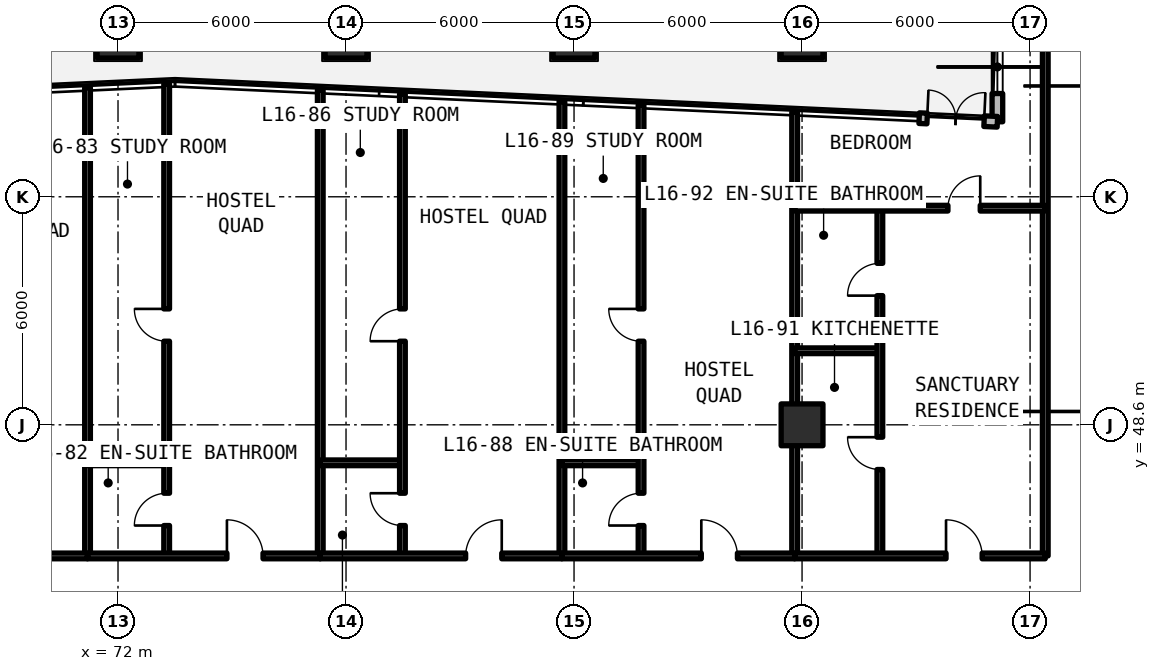
"""IFC4 building model, lengths in metres.
Left out: names, types, materials, properties, quantities, classifications, styles, units other than length and angle.
Written with IfcOpenShell. Run it as: python <this file> out.ifc"""

import sys

from ifc_helpers import new_model, si_unit, direction, frame, frame_2d, origin, origin_2d, place, context, subcontext, project, spatial, rectangle, extrude, element, fill, save


model = new_model("IFC4")
c1 = context("Model", 3, precision=1e-05, world=origin(), true_north=direction((0.0, 1.0)))
c2 = subcontext(c1, "Body", "Model", "MODEL_VIEW")
j1 = project(units=[si_unit("LENGTHUNIT", "METRE"), si_unit("PLANEANGLEUNIT", "RADIAN")], contexts=[c1])
p1 = place(None, origin())
s1 = spatial("IfcSite", under=j1, at=p1, CompositionType="ELEMENT")
p2 = place(p1, origin())
s2 = spatial("IfcBuilding", under=s1, at=p2, CompositionType="ELEMENT")
p3 = place(p2, frame((0.0, 0.0, 58.74)))
s3 = spatial("IfcBuildingStorey", under=s2, at=p3, CompositionType="ELEMENT", Elevation=58.74)
for number, where, z_axis, x_axis in (
    (1, (90.0, 48.6, 0.0), (0.0, 0.0, 1.0), (1.0, 0.0, 0.0)),
    (2, (72.0, 58.8, 0.0), (0.0, 0.0, 1.0), (1.0, 0.0, 0.0)),
    (3, (78.0, 58.8, 0.0), (0.0, 0.0, 1.0), (1.0, 0.0, 0.0)),
    (4, (84.0, 58.8, 0.0), (0.0, 0.0, 1.0), (1.0, 0.0, 0.0)),
    (5, (90.0, 58.8, 0.0), (0.0, 0.0, 1.0), (1.0, 0.0, 0.0)),
):
    element("IfcColumn", number, at=place(p3, frame(where, z_axis=z_axis, x_axis=x_axis)), inside=s3, PredefinedType="COLUMN", context=c2, shape_type="SweptSolid", body=[
        extrude(rectangle(XDim=1.1, YDim=1.1, at=origin_2d()), origin(), (0.0, 0.0, 1.0), 3.63),
    ])
p4 = place(p3, frame((100.66, 55.342, 0.0), z_axis=(0.0, 0.0, 1.0), x_axis=(-0.707106781187, 0.707106781187, 0.0)))
e6 = element("IfcWall", 6, at=p4, inside=s3, PredefinedType="SOLIDWALL", context=c2, shape_type="SweptSolid", body=[
    extrude(rectangle(XDim=5.824, YDim=0.28, at=frame_2d((2.912, 0.0))), origin(), (0.0, 0.0, 1.0), 3.41),
])
p5 = place(p4, frame((1.212, 0.0, 0.78)))
e7 = element("IfcOpeningElement", 7, at=p5, cuts=e6, PredefinedType="OPENING", context=c2, shape_type="SweptSolid", body=[
    extrude(rectangle(XDim=3.4, YDim=1.66, at=frame_2d((1.7, 0.83))), frame((0.0, 0.15, 0.0), z_axis=(0.0, -1.0, 0.0), x_axis=(1.0, 0.0, 0.0)), (0.0, 0.0, 1.0), 0.3),
])
p6 = place(p3, frame((95.14, 59.46, 0.0), z_axis=(0.0, 0.0, 1.0), x_axis=(0.0, -1.0, 0.0)))
e8 = element("IfcWall", 8, at=p6, inside=s3, PredefinedType="SOLIDWALL", context=c2, shape_type="SweptSolid", body=[
    extrude(rectangle(XDim=2.887, YDim=0.28, at=frame_2d((1.443, 0.0))), origin(), (0.0, 0.0, 1.0), 3.41),
])
p7 = place(p6, frame((0.743, 0.0, 0.78)))
e9 = element("IfcOpeningElement", 9, at=p7, cuts=e8, PredefinedType="OPENING", context=c2, shape_type="SweptSolid", body=[
    extrude(rectangle(XDim=1.4, YDim=1.65, at=frame_2d((0.7, 0.825))), frame((0.0, 0.15, 0.0), z_axis=(0.0, -1.0, 0.0), x_axis=(1.0, 0.0, 0.0)), (0.0, 0.0, 1.0), 0.3),
])
p8 = place(p3, frame((95.14, 56.573, 0.0), z_axis=(0.0, 0.0, 1.0), x_axis=(-0.998920086078, 0.046461399352, 0.0)))
e10 = element("IfcWall", 10, at=p8, inside=s3, PredefinedType="SOLIDWALL", context=c2, shape_type="SweptSolid", body=[
    extrude(rectangle(XDim=2.06, YDim=0.28, at=frame_2d((1.03, 0.0))), origin(), (0.0, 0.0, 1.0), 3.41),
])
p9 = place(p8, frame((0.35, 0.0, 0.0)))
e11 = element("IfcOpeningElement", 11, at=p9, cuts=e10, PredefinedType="OPENING", context=c2, shape_type="SweptSolid", body=[
    extrude(rectangle(XDim=1.5, YDim=2.2, at=frame_2d((0.75, 1.1))), frame((0.0, 0.15, 0.0), z_axis=(0.0, -1.0, 0.0), x_axis=(1.0, 0.0, 0.0)), (0.0, 0.0, 1.0), 0.3),
])
p10 = place(p3, frame((96.4, 45.15, 0.0), z_axis=(0.0, 0.0, 1.0), x_axis=(0.0, 1.0, 0.0)))
e12 = element("IfcWall", 12, at=p10, inside=s3, PredefinedType="SOLIDWALL", context=c2, shape_type="SweptSolid", body=[
    extrude(rectangle(XDim=14.31, YDim=0.15, at=frame_2d((7.155, 0.0))), origin(), (0.0, 0.0, 1.0), 2.63),
])
p11 = place(p3, frame((71.198, 45.15, 0.0), z_axis=(0.0, 0.0, 1.0), x_axis=(0.0, 1.0, 0.0)))
e13 = element("IfcWall", 13, at=p11, inside=s3, PredefinedType="SOLIDWALL", context=c2, shape_type="SweptSolid", body=[
    extrude(rectangle(XDim=12.323, YDim=0.15, at=frame_2d((6.162, 0.0))), origin(), (0.0, 0.0, 1.0), 2.63),
])
p12 = place(p3, frame((64.603, 45.15, 0.0), z_axis=(0.0, 0.0, 1.0), x_axis=(1.0, 0.0, 0.0)))
e14 = element("IfcWall", 14, at=p12, inside=s3, PredefinedType="SOLIDWALL", context=c2, shape_type="SweptSolid", body=[
    extrude(rectangle(XDim=6.595, YDim=0.15, at=frame_2d((3.297, 0.0))), origin(), (0.0, 0.0, 1.0), 2.63),
])
p13 = place(p12, frame((3.984, 0.0, 0.0)))
e15 = element("IfcOpeningElement", 15, at=p13, cuts=e14, PredefinedType="OPENING", context=c2, shape_type="SweptSolid", body=[
    extrude(rectangle(XDim=0.95, YDim=2.15, at=frame_2d((0.475, 1.075))), frame((0.0, 0.085, 0.0), z_axis=(0.0, -1.0, 0.0), x_axis=(1.0, 0.0, 0.0)), (0.0, 0.0, 1.0), 0.17),
])
p14 = place(p3, frame((77.322, 45.15, 0.0), z_axis=(0.0, 0.0, 1.0), x_axis=(0.0, 1.0, 0.0)))
e16 = element("IfcWall", 16, at=p14, inside=s3, PredefinedType="SOLIDWALL", context=c2, shape_type="SweptSolid", body=[
    extrude(rectangle(XDim=12.252, YDim=0.15, at=frame_2d((6.126, 0.0))), origin(), (0.0, 0.0, 1.0), 2.63),
])
p15 = place(p3, frame((71.198, 47.6, 0.0), z_axis=(0.0, 0.0, 1.0), x_axis=(1.0, 0.0, 0.0)))
e17 = element("IfcWall", 17, at=p15, inside=s3, PredefinedType="PARTITIONING", context=c2, shape_type="SweptSolid", body=[
    extrude(rectangle(XDim=2.082, YDim=0.15, at=frame_2d((1.041, 0.0))), origin(), (0.0, 0.0, 1.0), 2.63),
])
p16 = place(p3, frame((73.28, 45.15, 0.0), z_axis=(0.0, 0.0, 1.0), x_axis=(0.0, 1.0, 0.0)))
e18 = element("IfcWall", 18, at=p16, inside=s3, PredefinedType="PARTITIONING", context=c2, shape_type="SweptSolid", body=[
    extrude(rectangle(XDim=12.42, YDim=0.15, at=frame_2d((6.21, 0.0))), origin(), (0.0, 0.0, 1.0), 2.63),
])
p17 = place(p16, frame((0.8, 0.0, 0.0)))
e19 = element("IfcOpeningElement", 19, at=p17, cuts=e18, PredefinedType="OPENING", context=c2, shape_type="SweptSolid", body=[
    extrude(rectangle(XDim=0.85, YDim=2.1, at=frame_2d((0.425, 1.05))), frame((0.0, 0.085, 0.0), z_axis=(0.0, -1.0, 0.0), x_axis=(1.0, 0.0, 0.0)), (0.0, 0.0, 1.0), 0.17),
])
p18 = place(p16, frame((5.65, 0.0, 0.0)))
e20 = element("IfcOpeningElement", 20, at=p18, cuts=e18, PredefinedType="OPENING", context=c2, shape_type="SweptSolid", body=[
    extrude(rectangle(XDim=0.85, YDim=2.1, at=frame_2d((0.425, 1.05))), frame((0.0, 0.085, 0.0), z_axis=(0.0, -1.0, 0.0), x_axis=(1.0, 0.0, 0.0)), (0.0, 0.0, 1.0), 0.17),
])
p19 = place(p3, frame((71.198, 45.15, 0.0), z_axis=(0.0, 0.0, 1.0), x_axis=(1.0, 0.0, 0.0)))
e21 = element("IfcWall", 21, at=p19, inside=s3, PredefinedType="SOLIDWALL", context=c2, shape_type="SweptSolid", body=[
    extrude(rectangle(XDim=6.124, YDim=0.15, at=frame_2d((3.062, 0.0))), origin(), (0.0, 0.0, 1.0), 2.63),
])
p20 = place(p19, frame((3.668, 0.0, 0.0)))
e22 = element("IfcOpeningElement", 22, at=p20, cuts=e21, PredefinedType="OPENING", context=c2, shape_type="SweptSolid", body=[
    extrude(rectangle(XDim=0.95, YDim=2.15, at=frame_2d((0.475, 1.075))), frame((0.0, 0.085, 0.0), z_axis=(0.0, -1.0, 0.0), x_axis=(1.0, 0.0, 0.0)), (0.0, 0.0, 1.0), 0.17),
])
p21 = place(p3, frame((83.681, 45.15, 0.0), z_axis=(0.0, 0.0, 1.0), x_axis=(0.0, 1.0, 0.0)))
e23 = element("IfcWall", 23, at=p21, inside=s3, PredefinedType="SOLIDWALL", context=c2, shape_type="SweptSolid", body=[
    extrude(rectangle(XDim=11.956, YDim=0.15, at=frame_2d((5.978, 0.0))), origin(), (0.0, 0.0, 1.0), 2.63),
])
p22 = place(p3, frame((77.322, 47.6, 0.0), z_axis=(0.0, 0.0, 1.0), x_axis=(1.0, 0.0, 0.0)))
e24 = element("IfcWall", 24, at=p22, inside=s3, PredefinedType="PARTITIONING", context=c2, shape_type="SweptSolid", body=[
    extrude(rectangle(XDim=2.162, YDim=0.15, at=frame_2d((1.081, 0.0))), origin(), (0.0, 0.0, 1.0), 2.63),
])
p23 = place(p3, frame((79.484, 45.15, 0.0), z_axis=(0.0, 0.0, 1.0), x_axis=(0.0, 1.0, 0.0)))
e25 = element("IfcWall", 25, at=p23, inside=s3, PredefinedType="PARTITIONING", context=c2, shape_type="SweptSolid", body=[
    extrude(rectangle(XDim=12.152, YDim=0.15, at=frame_2d((6.076, 0.0))), origin(), (0.0, 0.0, 1.0), 2.63),
])
p24 = place(p23, frame((0.8, 0.0, 0.0)))
e26 = element("IfcOpeningElement", 26, at=p24, cuts=e25, PredefinedType="OPENING", context=c2, shape_type="SweptSolid", body=[
    extrude(rectangle(XDim=0.85, YDim=2.1, at=frame_2d((0.425, 1.05))), frame((0.0, 0.085, 0.0), z_axis=(0.0, -1.0, 0.0), x_axis=(1.0, 0.0, 0.0)), (0.0, 0.0, 1.0), 0.17),
])
p25 = place(p23, frame((5.65, 0.0, 0.0)))
e27 = element("IfcOpeningElement", 27, at=p25, cuts=e25, PredefinedType="OPENING", context=c2, shape_type="SweptSolid", body=[
    extrude(rectangle(XDim=0.85, YDim=2.1, at=frame_2d((0.425, 1.05))), frame((0.0, 0.085, 0.0), z_axis=(0.0, -1.0, 0.0), x_axis=(1.0, 0.0, 0.0)), (0.0, 0.0, 1.0), 0.17),
])
p26 = place(p3, frame((77.322, 45.15, 0.0), z_axis=(0.0, 0.0, 1.0), x_axis=(1.0, 0.0, 0.0)))
e28 = element("IfcWall", 28, at=p26, inside=s3, PredefinedType="SOLIDWALL", context=c2, shape_type="SweptSolid", body=[
    extrude(rectangle(XDim=6.359, YDim=0.15, at=frame_2d((3.18, 0.0))), origin(), (0.0, 0.0, 1.0), 2.63),
])
p27 = place(p26, frame((3.826, 0.0, 0.0)))
e29 = element("IfcOpeningElement", 29, at=p27, cuts=e28, PredefinedType="OPENING", context=c2, shape_type="SweptSolid", body=[
    extrude(rectangle(XDim=0.95, YDim=2.15, at=frame_2d((0.475, 1.075))), frame((0.0, 0.085, 0.0), z_axis=(0.0, -1.0, 0.0), x_axis=(1.0, 0.0, 0.0)), (0.0, 0.0, 1.0), 0.17),
])
p28 = place(p3, frame((89.805, 45.15, 0.0), z_axis=(0.0, 0.0, 1.0), x_axis=(0.0, 1.0, 0.0)))
e30 = element("IfcWall", 30, at=p28, inside=s3, PredefinedType="SOLIDWALL", context=c2, shape_type="SweptSolid", body=[
    extrude(rectangle(XDim=11.672, YDim=0.15, at=frame_2d((5.836, 0.0))), origin(), (0.0, 0.0, 1.0), 2.63),
])
p29 = place(p3, frame((83.681, 47.6, 0.0), z_axis=(0.0, 0.0, 1.0), x_axis=(1.0, 0.0, 0.0)))
e31 = element("IfcWall", 31, at=p29, inside=s3, PredefinedType="PARTITIONING", context=c2, shape_type="SweptSolid", body=[
    extrude(rectangle(XDim=2.082, YDim=0.15, at=frame_2d((1.041, 0.0))), origin(), (0.0, 0.0, 1.0), 2.63),
])
p30 = place(p3, frame((85.763, 45.15, 0.0), z_axis=(0.0, 0.0, 1.0), x_axis=(0.0, 1.0, 0.0)))
e32 = element("IfcWall", 32, at=p30, inside=s3, PredefinedType="PARTITIONING", context=c2, shape_type="SweptSolid", body=[
    extrude(rectangle(XDim=11.86, YDim=0.15, at=frame_2d((5.93, 0.0))), origin(), (0.0, 0.0, 1.0), 2.63),
])
p31 = place(p30, frame((0.8, 0.0, 0.0)))
e33 = element("IfcOpeningElement", 33, at=p31, cuts=e32, PredefinedType="OPENING", context=c2, shape_type="SweptSolid", body=[
    extrude(rectangle(XDim=0.85, YDim=2.1, at=frame_2d((0.425, 1.05))), frame((0.0, 0.085, 0.0), z_axis=(0.0, -1.0, 0.0), x_axis=(1.0, 0.0, 0.0)), (0.0, 0.0, 1.0), 0.17),
])
p32 = place(p30, frame((5.65, 0.0, 0.0)))
e34 = element("IfcOpeningElement", 34, at=p32, cuts=e32, PredefinedType="OPENING", context=c2, shape_type="SweptSolid", body=[
    extrude(rectangle(XDim=0.85, YDim=2.1, at=frame_2d((0.425, 1.05))), frame((0.0, 0.085, 0.0), z_axis=(0.0, -1.0, 0.0), x_axis=(1.0, 0.0, 0.0)), (0.0, 0.0, 1.0), 0.17),
])
p33 = place(p3, frame((83.681, 45.15, 0.0), z_axis=(0.0, 0.0, 1.0), x_axis=(1.0, 0.0, 0.0)))
e35 = element("IfcWall", 35, at=p33, inside=s3, PredefinedType="SOLIDWALL", context=c2, shape_type="SweptSolid", body=[
    extrude(rectangle(XDim=6.124, YDim=0.15, at=frame_2d((3.062, 0.0))), origin(), (0.0, 0.0, 1.0), 2.63),
])
p34 = place(p33, frame((3.668, 0.0, 0.0)))
e36 = element("IfcOpeningElement", 36, at=p34, cuts=e35, PredefinedType="OPENING", context=c2, shape_type="SweptSolid", body=[
    extrude(rectangle(XDim=0.95, YDim=2.15, at=frame_2d((0.475, 1.075))), frame((0.0, 0.085, 0.0), z_axis=(0.0, -1.0, 0.0), x_axis=(1.0, 0.0, 0.0)), (0.0, 0.0, 1.0), 0.17),
])
p35 = place(p3, frame((89.805, 50.549, 0.0), z_axis=(0.0, 0.0, 1.0), x_axis=(1.0, 0.0, 0.0)))
e37 = element("IfcWall", 37, at=p35, inside=s3, PredefinedType="PARTITIONING", context=c2, shape_type="SweptSolid", body=[
    extrude(rectangle(XDim=2.242, YDim=0.15, at=frame_2d((1.121, 0.0))), origin(), (0.0, 0.0, 1.0), 2.63),
])
p36 = place(p3, frame((92.047, 45.15, 0.0), z_axis=(0.0, 0.0, 1.0), x_axis=(0.0, 1.0, 0.0)))
e38 = element("IfcWall", 38, at=p36, inside=s3, PredefinedType="PARTITIONING", context=c2, shape_type="SweptSolid", body=[
    extrude(rectangle(XDim=9.15, YDim=0.15, at=frame_2d((4.575, 0.0))), origin(), (0.0, 0.0, 1.0), 2.63),
])
p37 = place(p36, frame((2.274, 0.0, 0.0)))
e39 = element("IfcOpeningElement", 39, at=p37, cuts=e38, PredefinedType="OPENING", context=c2, shape_type="SweptSolid", body=[
    extrude(rectangle(XDim=0.85, YDim=2.1, at=frame_2d((0.425, 1.05))), frame((0.0, 0.085, 0.0), z_axis=(0.0, -1.0, 0.0), x_axis=(1.0, 0.0, 0.0)), (0.0, 0.0, 1.0), 0.17),
])
p38 = place(p36, frame((6.849, 0.0, 0.0)))
e40 = element("IfcOpeningElement", 40, at=p38, cuts=e38, PredefinedType="OPENING", context=c2, shape_type="SweptSolid", body=[
    extrude(rectangle(XDim=0.85, YDim=2.1, at=frame_2d((0.425, 1.05))), frame((0.0, 0.085, 0.0), z_axis=(0.0, -1.0, 0.0), x_axis=(1.0, 0.0, 0.0)), (0.0, 0.0, 1.0), 0.17),
])
p39 = place(p3, frame((89.805, 54.3, 0.0), z_axis=(0.0, 0.0, 1.0), x_axis=(1.0, 0.0, 0.0)))
e41 = element("IfcWall", 41, at=p39, inside=s3, PredefinedType="PARTITIONING", context=c2, shape_type="SweptSolid", body=[
    extrude(rectangle(XDim=6.595, YDim=0.15, at=frame_2d((3.297, 0.0))), origin(), (0.0, 0.0, 1.0), 2.63),
])
p40 = place(p39, frame((4.034, 0.0, 0.0)))
e42 = element("IfcOpeningElement", 42, at=p40, cuts=e41, PredefinedType="OPENING", context=c2, shape_type="SweptSolid", body=[
    extrude(rectangle(XDim=0.85, YDim=2.1, at=frame_2d((0.425, 1.05))), frame((0.0, 0.085, 0.0), z_axis=(0.0, -1.0, 0.0), x_axis=(1.0, 0.0, 0.0)), (0.0, 0.0, 1.0), 0.17),
])
p41 = place(p3, frame((89.805, 45.15, 0.0), z_axis=(0.0, 0.0, 1.0), x_axis=(1.0, 0.0, 0.0)))
e43 = element("IfcWall", 43, at=p41, inside=s3, PredefinedType="SOLIDWALL", context=c2, shape_type="SweptSolid", body=[
    extrude(rectangle(XDim=6.595, YDim=0.15, at=frame_2d((3.297, 0.0))), origin(), (0.0, 0.0, 1.0), 2.63),
])
p42 = place(p41, frame((3.984, 0.0, 0.0)))
e44 = element("IfcOpeningElement", 44, at=p42, cuts=e43, PredefinedType="OPENING", context=c2, shape_type="SweptSolid", body=[
    extrude(rectangle(XDim=0.95, YDim=2.15, at=frame_2d((0.475, 1.075))), frame((0.0, 0.085, 0.0), z_axis=(0.0, -1.0, 0.0), x_axis=(1.0, 0.0, 0.0)), (0.0, 0.0, 1.0), 0.17),
])
p43 = place(p7, origin())
e45 = element("IfcWindow", 45, at=p43, inside=s3, PartitioningType="SINGLE_PANEL", PredefinedType="WINDOW", context=c2, shape_type="SweptSolid", body=[
    extrude(rectangle(XDim=1.4, YDim=1.65, at=frame_2d((0.7, 0.825))), frame((0.0, 0.03, 0.0), z_axis=(0.0, -1.0, 0.0), x_axis=(1.0, 0.0, 0.0)), (0.0, 0.0, 1.0), 0.06),
])
fill(e9, e45)
p44 = place(p9, frame((1.5, 0.0, 0.0), z_axis=(0.0, 0.0, 1.0), x_axis=(-1.0, 0.0, 0.0)))
e46 = element("IfcDoor", 46, at=p44, inside=s3, OperationType="SINGLE_SWING_RIGHT", PredefinedType="DOOR", context=c2, shape_type="SweptSolid", body=[
    extrude(rectangle(XDim=1.5, YDim=2.2, at=frame_2d((0.75, 1.1))), frame((0.0, 0.025, 0.0), z_axis=(0.0, -1.0, 0.0), x_axis=(1.0, 0.0, 0.0)), (0.0, 0.0, 1.0), 0.05),
])
fill(e11, e46)
p45 = place(p17, origin())
e47 = element("IfcDoor", 47, at=p45, inside=s3, OperationType="SINGLE_SWING_LEFT", PredefinedType="DOOR", context=c2, shape_type="SweptSolid", body=[
    extrude(rectangle(XDim=0.85, YDim=2.1, at=frame_2d((0.425, 1.05))), frame((0.0, 0.025, 0.0), z_axis=(0.0, -1.0, 0.0), x_axis=(1.0, 0.0, 0.0)), (0.0, 0.0, 1.0), 0.05),
])
fill(e19, e47)
p46 = place(p18, origin())
e48 = element("IfcDoor", 48, at=p46, inside=s3, OperationType="SINGLE_SWING_RIGHT", PredefinedType="DOOR", context=c2, shape_type="SweptSolid", body=[
    extrude(rectangle(XDim=0.85, YDim=2.1, at=frame_2d((0.425, 1.05))), frame((0.0, 0.025, 0.0), z_axis=(0.0, -1.0, 0.0), x_axis=(1.0, 0.0, 0.0)), (0.0, 0.0, 1.0), 0.05),
])
fill(e20, e48)
p47 = place(p20, origin())
e49 = element("IfcDoor", 49, at=p47, inside=s3, OperationType="SINGLE_SWING_LEFT", PredefinedType="DOOR", context=c2, shape_type="SweptSolid", body=[
    extrude(rectangle(XDim=0.95, YDim=2.15, at=frame_2d((0.475, 1.075))), frame((0.0, 0.025, 0.0), z_axis=(0.0, -1.0, 0.0), x_axis=(1.0, 0.0, 0.0)), (0.0, 0.0, 1.0), 0.05),
])
fill(e22, e49)
p48 = place(p24, origin())
e50 = element("IfcDoor", 50, at=p48, inside=s3, OperationType="SINGLE_SWING_RIGHT", PredefinedType="DOOR", context=c2, shape_type="SweptSolid", body=[
    extrude(rectangle(XDim=0.85, YDim=2.1, at=frame_2d((0.425, 1.05))), frame((0.0, 0.025, 0.0), z_axis=(0.0, -1.0, 0.0), x_axis=(1.0, 0.0, 0.0)), (0.0, 0.0, 1.0), 0.05),
])
fill(e26, e50)
p49 = place(p25, origin())
e51 = element("IfcDoor", 51, at=p49, inside=s3, OperationType="SINGLE_SWING_LEFT", PredefinedType="DOOR", context=c2, shape_type="SweptSolid", body=[
    extrude(rectangle(XDim=0.85, YDim=2.1, at=frame_2d((0.425, 1.05))), frame((0.0, 0.025, 0.0), z_axis=(0.0, -1.0, 0.0), x_axis=(1.0, 0.0, 0.0)), (0.0, 0.0, 1.0), 0.05),
])
fill(e27, e51)
p50 = place(p27, origin())
e52 = element("IfcDoor", 52, at=p50, inside=s3, OperationType="SINGLE_SWING_RIGHT", PredefinedType="DOOR", context=c2, shape_type="SweptSolid", body=[
    extrude(rectangle(XDim=0.95, YDim=2.15, at=frame_2d((0.475, 1.075))), frame((0.0, 0.025, 0.0), z_axis=(0.0, -1.0, 0.0), x_axis=(1.0, 0.0, 0.0)), (0.0, 0.0, 1.0), 0.05),
])
fill(e29, e52)
p51 = place(p31, origin())
e53 = element("IfcDoor", 53, at=p51, inside=s3, OperationType="SINGLE_SWING_LEFT", PredefinedType="DOOR", context=c2, shape_type="SweptSolid", body=[
    extrude(rectangle(XDim=0.85, YDim=2.1, at=frame_2d((0.425, 1.05))), frame((0.0, 0.025, 0.0), z_axis=(0.0, -1.0, 0.0), x_axis=(1.0, 0.0, 0.0)), (0.0, 0.0, 1.0), 0.05),
])
fill(e33, e53)
p52 = place(p32, origin())
e54 = element("IfcDoor", 54, at=p52, inside=s3, OperationType="SINGLE_SWING_RIGHT", PredefinedType="DOOR", context=c2, shape_type="SweptSolid", body=[
    extrude(rectangle(XDim=0.85, YDim=2.1, at=frame_2d((0.425, 1.05))), frame((0.0, 0.025, 0.0), z_axis=(0.0, -1.0, 0.0), x_axis=(1.0, 0.0, 0.0)), (0.0, 0.0, 1.0), 0.05),
])
fill(e34, e54)
p53 = place(p34, origin())
e55 = element("IfcDoor", 55, at=p53, inside=s3, OperationType="SINGLE_SWING_LEFT", PredefinedType="DOOR", context=c2, shape_type="SweptSolid", body=[
    extrude(rectangle(XDim=0.95, YDim=2.15, at=frame_2d((0.475, 1.075))), frame((0.0, 0.025, 0.0), z_axis=(0.0, -1.0, 0.0), x_axis=(1.0, 0.0, 0.0)), (0.0, 0.0, 1.0), 0.05),
])
fill(e36, e55)
p54 = place(p37, origin())
e56 = element("IfcDoor", 56, at=p54, inside=s3, OperationType="SINGLE_SWING_RIGHT", PredefinedType="DOOR", context=c2, shape_type="SweptSolid", body=[
    extrude(rectangle(XDim=0.85, YDim=2.1, at=frame_2d((0.425, 1.05))), frame((0.0, 0.025, 0.0), z_axis=(0.0, -1.0, 0.0), x_axis=(1.0, 0.0, 0.0)), (0.0, 0.0, 1.0), 0.05),
])
fill(e39, e56)
p55 = place(p38, origin())
e57 = element("IfcDoor", 57, at=p55, inside=s3, OperationType="SINGLE_SWING_LEFT", PredefinedType="DOOR", context=c2, shape_type="SweptSolid", body=[
    extrude(rectangle(XDim=0.85, YDim=2.1, at=frame_2d((0.425, 1.05))), frame((0.0, 0.025, 0.0), z_axis=(0.0, -1.0, 0.0), x_axis=(1.0, 0.0, 0.0)), (0.0, 0.0, 1.0), 0.05),
])
fill(e40, e57)
p56 = place(p40, origin())
e58 = element("IfcDoor", 58, at=p56, inside=s3, OperationType="SINGLE_SWING_RIGHT", PredefinedType="DOOR", context=c2, shape_type="SweptSolid", body=[
    extrude(rectangle(XDim=0.85, YDim=2.1, at=frame_2d((0.425, 1.05))), frame((0.0, 0.025, 0.0), z_axis=(0.0, -1.0, 0.0), x_axis=(1.0, 0.0, 0.0)), (0.0, 0.0, 1.0), 0.05),
])
fill(e42, e58)
p57 = place(p42, origin())
e59 = element("IfcDoor", 59, at=p57, inside=s3, OperationType="SINGLE_SWING_LEFT", PredefinedType="DOOR", context=c2, shape_type="SweptSolid", body=[
    extrude(rectangle(XDim=0.95, YDim=2.15, at=frame_2d((0.475, 1.075))), frame((0.0, 0.025, 0.0), z_axis=(0.0, -1.0, 0.0), x_axis=(1.0, 0.0, 0.0)), (0.0, 0.0, 1.0), 0.05),
])
fill(e44, e59)
save(model, sys.argv[1])
